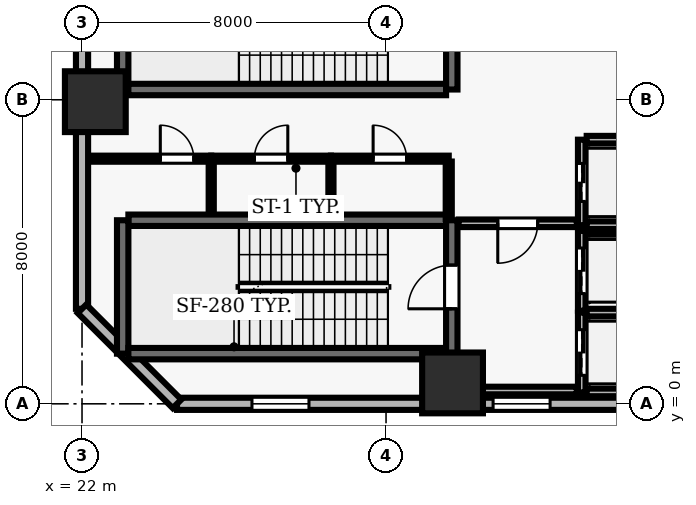
"""IFC4 building model, lengths in metres.
Left out: names, types, materials, properties, quantities, classifications, styles, units other than length and angle.
Written with IfcOpenShell. Run it as: python <this file> out.ifc"""

import sys

from ifc_helpers import new_model, si_unit, direction, frame, frame_2d, origin, origin_2d, place, context, subcontext, project, spatial, rectangle, extrude, element, fill, save


model = new_model("IFC4")
c1 = context("Model", 3, precision=1e-05, world=origin(), true_north=direction((0.0, 1.0)))
c2 = subcontext(c1, "Body", "Model", "MODEL_VIEW")
j1 = project(units=[si_unit("LENGTHUNIT", "METRE"), si_unit("PLANEANGLEUNIT", "RADIAN")], contexts=[c1])
p1 = place(None, origin())
s1 = spatial("IfcSite", under=j1, at=p1, CompositionType="ELEMENT")
p2 = place(p1, origin())
s2 = spatial("IfcBuilding", under=s1, at=p2, CompositionType="ELEMENT")
p3 = place(p2, frame((0.0, 0.0, 5.2)))
s3 = spatial("IfcBuildingStorey", under=s2, at=p3, CompositionType="ELEMENT", Elevation=5.2)
for number, where, z_axis, x_axis in (
    (1, (31.75, 0.55, 0.0), (0.0, 0.0, 1.0), (1.0, 0.0, 0.0)),
    (2, (22.35, 7.95, 0.0), (0.0, 0.0, 1.0), (1.0, 0.0, 0.0)),
):
    element("IfcColumn", number, at=place(p3, frame(where, z_axis=z_axis, x_axis=x_axis)), inside=s3, PredefinedType="COLUMN", context=c2, shape_type="SweptSolid", body=[
        extrude(rectangle(XDim=1.6, YDim=1.6, at=origin_2d()), origin(), (0.0, 0.0, 1.0), 5.2),
    ])
p4 = place(p3, frame((24.5, 0.0, 0.0), z_axis=(0.0, 0.0, 1.0), x_axis=(1.0, 0.0, 0.0)))
e3 = element("IfcWall", 3, at=p4, inside=s3, PredefinedType="SOLIDWALL", context=c2, shape_type="SweptSolid", body=[
    extrude(rectangle(XDim=49.0, YDim=0.32, at=frame_2d((24.5, 0.0))), origin(), (0.0, 0.0, 1.0), 4.92),
])
p5 = place(p4, frame((1.972, 0.0, 0.9)))
e4 = element("IfcOpeningElement", 4, at=p5, cuts=e3, PredefinedType="OPENING", context=c2, shape_type="SweptSolid", body=[
    extrude(rectangle(XDim=1.5, YDim=1.6, at=frame_2d((0.75, 0.8))), frame((0.0, 0.17, 0.0), z_axis=(0.0, -1.0, 0.0), x_axis=(1.0, 0.0, 0.0)), (0.0, 0.0, 1.0), 0.34),
])
p6 = place(p4, frame((8.317, 0.0, 0.9)))
e5 = element("IfcOpeningElement", 5, at=p6, cuts=e3, PredefinedType="OPENING", context=c2, shape_type="SweptSolid", body=[
    extrude(rectangle(XDim=1.5, YDim=1.6, at=frame_2d((0.75, 0.8))), frame((0.0, 0.17, 0.0), z_axis=(0.0, -1.0, 0.0), x_axis=(1.0, 0.0, 0.0)), (0.0, 0.0, 1.0), 0.34),
])
p7 = place(p4, frame((18.306, 0.0, 0.9)))
e6 = element("IfcOpeningElement", 6, at=p7, cuts=e3, PredefinedType="OPENING", context=c2, shape_type="SweptSolid", body=[
    extrude(rectangle(XDim=1.5, YDim=1.6, at=frame_2d((0.75, 0.8))), frame((0.0, 0.17, 0.0), z_axis=(0.0, -1.0, 0.0), x_axis=(1.0, 0.0, 0.0)), (0.0, 0.0, 1.0), 0.34),
])
p8 = place(p4, frame((23.75, 0.0, 0.9)))
e7 = element("IfcOpeningElement", 7, at=p8, cuts=e3, PredefinedType="OPENING", context=c2, shape_type="SweptSolid", body=[
    extrude(rectangle(XDim=1.5, YDim=1.6, at=frame_2d((0.75, 0.8))), frame((0.0, 0.17, 0.0), z_axis=(0.0, -1.0, 0.0), x_axis=(1.0, 0.0, 0.0)), (0.0, 0.0, 1.0), 0.34),
])
p9 = place(p4, frame((29.194, 0.0, 0.9)))
e8 = element("IfcOpeningElement", 8, at=p9, cuts=e3, PredefinedType="OPENING", context=c2, shape_type="SweptSolid", body=[
    extrude(rectangle(XDim=1.5, YDim=1.6, at=frame_2d((0.75, 0.8))), frame((0.0, 0.17, 0.0), z_axis=(0.0, -1.0, 0.0), x_axis=(1.0, 0.0, 0.0)), (0.0, 0.0, 1.0), 0.34),
])
p10 = place(p4, frame((34.639, 0.0, 0.9)))
e9 = element("IfcOpeningElement", 9, at=p10, cuts=e3, PredefinedType="OPENING", context=c2, shape_type="SweptSolid", body=[
    extrude(rectangle(XDim=1.5, YDim=1.6, at=frame_2d((0.75, 0.8))), frame((0.0, 0.17, 0.0), z_axis=(0.0, -1.0, 0.0), x_axis=(1.0, 0.0, 0.0)), (0.0, 0.0, 1.0), 0.34),
])
p11 = place(p4, frame((40.083, 0.0, 0.9)))
e10 = element("IfcOpeningElement", 10, at=p11, cuts=e3, PredefinedType="OPENING", context=c2, shape_type="SweptSolid", body=[
    extrude(rectangle(XDim=1.5, YDim=1.6, at=frame_2d((0.75, 0.8))), frame((0.0, 0.17, 0.0), z_axis=(0.0, -1.0, 0.0), x_axis=(1.0, 0.0, 0.0)), (0.0, 0.0, 1.0), 0.34),
])
p12 = place(p4, frame((45.528, 0.0, 0.9)))
e11 = element("IfcOpeningElement", 11, at=p12, cuts=e3, PredefinedType="OPENING", context=c2, shape_type="SweptSolid", body=[
    extrude(rectangle(XDim=1.5, YDim=1.6, at=frame_2d((0.75, 0.8))), frame((0.0, 0.17, 0.0), z_axis=(0.0, -1.0, 0.0), x_axis=(1.0, 0.0, 0.0)), (0.0, 0.0, 1.0), 0.34),
])
p13 = place(p3, frame((22.0, 51.5, 0.0), z_axis=(0.0, 0.0, 1.0), x_axis=(0.0, -1.0, 0.0)))
e12 = element("IfcWall", 12, at=p13, inside=s3, PredefinedType="SOLIDWALL", context=c2, shape_type="SweptSolid", body=[
    extrude(rectangle(XDim=49.0, YDim=0.32, at=frame_2d((24.5, 0.0))), origin(), (0.0, 0.0, 1.0), 4.92),
])
p14 = place(p13, frame((1.522, 0.0, 0.9)))
e13 = element("IfcOpeningElement", 13, at=p14, cuts=e12, PredefinedType="OPENING", context=c2, shape_type="SweptSolid", body=[
    extrude(rectangle(XDim=2.4, YDim=2.2, at=frame_2d((1.2, 1.1))), frame((0.0, 0.17, 0.0), z_axis=(0.0, -1.0, 0.0), x_axis=(1.0, 0.0, 0.0)), (0.0, 0.0, 1.0), 0.34),
])
p15 = place(p13, frame((6.967, 0.0, 0.9)))
e14 = element("IfcOpeningElement", 14, at=p15, cuts=e12, PredefinedType="OPENING", context=c2, shape_type="SweptSolid", body=[
    extrude(rectangle(XDim=2.4, YDim=2.2, at=frame_2d((1.2, 1.1))), frame((0.0, 0.17, 0.0), z_axis=(0.0, -1.0, 0.0), x_axis=(1.0, 0.0, 0.0)), (0.0, 0.0, 1.0), 0.34),
])
p16 = place(p13, frame((11.961, 0.0, 0.9)))
e15 = element("IfcOpeningElement", 15, at=p16, cuts=e12, PredefinedType="OPENING", context=c2, shape_type="SweptSolid", body=[
    extrude(rectangle(XDim=2.4, YDim=2.2, at=frame_2d((1.2, 1.1))), frame((0.0, 0.17, 0.0), z_axis=(0.0, -1.0, 0.0), x_axis=(1.0, 0.0, 0.0)), (0.0, 0.0, 1.0), 0.34),
])
p17 = place(p13, frame((17.856, 0.0, 0.9)))
e16 = element("IfcOpeningElement", 16, at=p17, cuts=e12, PredefinedType="OPENING", context=c2, shape_type="SweptSolid", body=[
    extrude(rectangle(XDim=2.4, YDim=2.2, at=frame_2d((1.2, 1.1))), frame((0.0, 0.17, 0.0), z_axis=(0.0, -1.0, 0.0), x_axis=(1.0, 0.0, 0.0)), (0.0, 0.0, 1.0), 0.34),
])
p18 = place(p13, frame((22.4, 0.0, 0.9)))
e17 = element("IfcOpeningElement", 17, at=p18, cuts=e12, PredefinedType="OPENING", context=c2, shape_type="SweptSolid", body=[
    extrude(rectangle(XDim=2.4, YDim=2.2, at=frame_2d((1.2, 1.1))), frame((0.0, 0.17, 0.0), z_axis=(0.0, -1.0, 0.0), x_axis=(1.0, 0.0, 0.0)), (0.0, 0.0, 1.0), 0.34),
])
p19 = place(p13, frame((29.194, 0.0, 0.9)))
e18 = element("IfcOpeningElement", 18, at=p19, cuts=e12, PredefinedType="OPENING", context=c2, shape_type="SweptSolid", body=[
    extrude(rectangle(XDim=2.4, YDim=2.2, at=frame_2d((1.2, 1.1))), frame((0.0, 0.17, 0.0), z_axis=(0.0, -1.0, 0.0), x_axis=(1.0, 0.0, 0.0)), (0.0, 0.0, 1.0), 0.34),
])
p20 = place(p13, frame((33.289, 0.0, 0.9)))
e19 = element("IfcOpeningElement", 19, at=p20, cuts=e12, PredefinedType="OPENING", context=c2, shape_type="SweptSolid", body=[
    extrude(rectangle(XDim=2.4, YDim=2.2, at=frame_2d((1.2, 1.1))), frame((0.0, 0.17, 0.0), z_axis=(0.0, -1.0, 0.0), x_axis=(1.0, 0.0, 0.0)), (0.0, 0.0, 1.0), 0.34),
])
p21 = place(p13, frame((39.633, 0.0, 0.9)))
e20 = element("IfcOpeningElement", 20, at=p21, cuts=e12, PredefinedType="OPENING", context=c2, shape_type="SweptSolid", body=[
    extrude(rectangle(XDim=2.4, YDim=2.2, at=frame_2d((1.2, 1.1))), frame((0.0, 0.17, 0.0), z_axis=(0.0, -1.0, 0.0), x_axis=(1.0, 0.0, 0.0)), (0.0, 0.0, 1.0), 0.34),
])
p22 = place(p3, frame((22.0, 2.5, 0.0), z_axis=(0.0, 0.0, 1.0), x_axis=(0.707106781187, -0.707106781187, 0.0)))
e21 = element("IfcWall", 21, at=p22, inside=s3, PredefinedType="SOLIDWALL", context=c2, shape_type="SweptSolid", body=[
    extrude(rectangle(XDim=3.536, YDim=0.32, at=frame_2d((1.768, 0.0))), origin(), (0.0, 0.0, 1.0), 4.92),
])
p23 = place(p3, frame((31.58, 4.83, 0.0), z_axis=(0.0, 0.0, 1.0), x_axis=(-1.0, 0.0, 0.0)))
e22 = element("IfcWall", 22, at=p23, inside=s3, PredefinedType="SHEAR", context=c2, shape_type="SweptSolid", body=[
    extrude(rectangle(XDim=8.36, YDim=0.3, at=frame_2d((4.18, 0.0))), origin(), (0.0, 0.0, 1.0), 4.92),
])
p24 = place(p3, frame((23.07, 4.83, 0.0), z_axis=(0.0, 0.0, 1.0), x_axis=(0.0, -1.0, 0.0)))
e23 = element("IfcWall", 23, at=p24, inside=s3, PredefinedType="SHEAR", context=c2, shape_type="SweptSolid", body=[
    extrude(rectangle(XDim=3.51, YDim=0.3, at=frame_2d((1.755, 0.0))), origin(), (0.0, 0.0, 1.0), 4.92),
])
p25 = place(p3, frame((23.22, 1.32, 0.0), z_axis=(0.0, 0.0, 1.0), x_axis=(1.0, 0.0, 0.0)))
e24 = element("IfcWall", 24, at=p25, inside=s3, PredefinedType="SHEAR", context=c2, shape_type="SweptSolid", body=[
    extrude(rectangle(XDim=8.36, YDim=0.3, at=frame_2d((4.18, 0.0))), origin(), (0.0, 0.0, 1.0), 4.92),
])
p26 = place(p3, frame((31.73, 0.96, 0.0), z_axis=(0.0, 0.0, 1.0), x_axis=(0.0, 1.0, 0.0)))
e25 = element("IfcWall", 25, at=p26, inside=s3, PredefinedType="SHEAR", context=c2, shape_type="SweptSolid", body=[
    extrude(rectangle(XDim=3.87, YDim=0.3, at=frame_2d((1.935, 0.0))), origin(), (0.0, 0.0, 1.0), 4.92),
])
p27 = place(p26, frame((1.54, 0.0, 0.0)))
e26 = element("IfcOpeningElement", 26, at=p27, cuts=e25, PredefinedType="OPENING", context=c2, shape_type="SweptSolid", body=[
    extrude(rectangle(XDim=1.15, YDim=2.15, at=frame_2d((0.575, 1.075))), frame((0.0, 0.16, 0.0), z_axis=(0.0, -1.0, 0.0), x_axis=(1.0, 0.0, 0.0)), (0.0, 0.0, 1.0), 0.32),
])
p28 = place(p3, frame((23.07, 11.78, 0.0), z_axis=(0.0, 0.0, 1.0), x_axis=(0.0, -1.0, 0.0)))
e27 = element("IfcWall", 27, at=p28, inside=s3, PredefinedType="SHEAR", context=c2, shape_type="SweptSolid", body=[
    extrude(rectangle(XDim=3.51, YDim=0.3, at=frame_2d((1.755, 0.0))), origin(), (0.0, 0.0, 1.0), 4.92),
])
p29 = place(p3, frame((23.22, 8.27, 0.0), z_axis=(0.0, 0.0, 1.0), x_axis=(1.0, 0.0, 0.0)))
e28 = element("IfcWall", 28, at=p29, inside=s3, PredefinedType="SHEAR", context=c2, shape_type="SweptSolid", body=[
    extrude(rectangle(XDim=8.36, YDim=0.3, at=frame_2d((4.18, 0.0))), origin(), (0.0, 0.0, 1.0), 4.92),
])
p30 = place(p3, frame((31.73, 8.27, 0.0), z_axis=(0.0, 0.0, 1.0), x_axis=(0.0, 1.0, 0.0)))
e29 = element("IfcWall", 29, at=p30, inside=s3, PredefinedType="SHEAR", context=c2, shape_type="SweptSolid", body=[
    extrude(rectangle(XDim=3.51, YDim=0.3, at=frame_2d((1.755, 0.0))), origin(), (0.0, 0.0, 1.0), 4.92),
])
p31 = place(p30, frame((1.18, 0.0, 0.0)))
e30 = element("IfcOpeningElement", 30, at=p31, cuts=e29, PredefinedType="OPENING", context=c2, shape_type="SweptSolid", body=[
    extrude(rectangle(XDim=1.15, YDim=2.15, at=frame_2d((0.575, 1.075))), frame((0.0, 0.16, 0.0), z_axis=(0.0, -1.0, 0.0), x_axis=(1.0, 0.0, 0.0)), (0.0, 0.0, 1.0), 0.32),
])
p32 = place(p3, frame((35.15, 2.4, 0.0), z_axis=(0.0, 0.0, 1.0), x_axis=(0.0, -1.0, 0.0)))
e31 = element("IfcWall", 31, at=p32, inside=s3, PredefinedType="SOLIDWALL", context=c2, shape_type="SweptSolid", body=[
    extrude(rectangle(XDim=2.1, YDim=0.2, at=frame_2d((1.05, 0.0))), origin(), (0.0, 0.0, 1.0), 4.92),
])
p33 = place(p32, frame((0.45, 0.0, 0.0)))
e32 = element("IfcOpeningElement", 32, at=p33, cuts=e31, PredefinedType="OPENING", context=c2, shape_type="SweptSolid", body=[
    extrude(rectangle(XDim=1.2, YDim=2.15, at=frame_2d((0.6, 1.075))), frame((0.0, 0.11, 0.0), z_axis=(0.0, -1.0, 0.0), x_axis=(1.0, 0.0, 0.0)), (0.0, 0.0, 1.0), 0.22),
])
for number, where, z_axis, x_axis in (
    (33, (35.28, 0.3, 0.0), (0.0, 0.0, 1.0), (1.0, 0.0, 0.0)),
    (34, (37.42, 2.4, 0.0), (0.0, 0.0, 1.0), (-1.0, 0.0, 0.0)),
):
    element("IfcWall", number, at=place(p3, frame(where, z_axis=z_axis, x_axis=x_axis)), inside=s3, PredefinedType="SOLIDWALL", context=c2, shape_type="SweptSolid", body=[
        extrude(rectangle(XDim=2.14, YDim=0.2, at=frame_2d((1.07, 0.0))), origin(), (0.0, 0.0, 1.0), 4.92),
    ])
p34 = place(p3, frame((35.15, 4.55, 0.0), z_axis=(0.0, 0.0, 1.0), x_axis=(0.0, -1.0, 0.0)))
e35 = element("IfcWall", 35, at=p34, inside=s3, PredefinedType="SOLIDWALL", context=c2, shape_type="SweptSolid", body=[
    extrude(rectangle(XDim=2.1, YDim=0.2, at=frame_2d((1.05, 0.0))), origin(), (0.0, 0.0, 1.0), 4.92),
])
p35 = place(p34, frame((0.45, 0.0, 0.0)))
e36 = element("IfcOpeningElement", 36, at=p35, cuts=e35, PredefinedType="OPENING", context=c2, shape_type="SweptSolid", body=[
    extrude(rectangle(XDim=1.2, YDim=2.15, at=frame_2d((0.6, 1.075))), frame((0.0, 0.11, 0.0), z_axis=(0.0, -1.0, 0.0), x_axis=(1.0, 0.0, 0.0)), (0.0, 0.0, 1.0), 0.22),
])
p36 = place(p3, frame((37.42, 4.55, 0.0), z_axis=(0.0, 0.0, 1.0), x_axis=(-1.0, 0.0, 0.0)))
e37 = element("IfcWall", 37, at=p36, inside=s3, PredefinedType="SOLIDWALL", context=c2, shape_type="SweptSolid", body=[
    extrude(rectangle(XDim=2.14, YDim=0.2, at=frame_2d((1.07, 0.0))), origin(), (0.0, 0.0, 1.0), 4.92),
])
p37 = place(p3, frame((35.15, 6.95, 0.0), z_axis=(0.0, 0.0, 1.0), x_axis=(0.0, -1.0, 0.0)))
e38 = element("IfcWall", 38, at=p37, inside=s3, PredefinedType="SOLIDWALL", context=c2, shape_type="SweptSolid", body=[
    extrude(rectangle(XDim=2.25, YDim=0.2, at=frame_2d((1.125, 0.0))), origin(), (0.0, 0.0, 1.0), 4.92),
])
p38 = place(p37, frame((0.625, 0.0, 0.0)))
e39 = element("IfcOpeningElement", 39, at=p38, cuts=e38, PredefinedType="OPENING", context=c2, shape_type="SweptSolid", body=[
    extrude(rectangle(XDim=1.0, YDim=2.1, at=frame_2d((0.5, 1.05))), frame((0.0, 0.11, 0.0), z_axis=(0.0, -1.0, 0.0), x_axis=(1.0, 0.0, 0.0)), (0.0, 0.0, 1.0), 0.22),
])
for number, where, z_axis, x_axis in (
    (40, (35.28, 4.7, 0.0), (0.0, 0.0, 1.0), (1.0, 0.0, 0.0)),
    (41, (37.42, 6.95, 0.0), (0.0, 0.0, 1.0), (-1.0, 0.0, 0.0)),
):
    element("IfcWall", number, at=place(p3, frame(where, z_axis=z_axis, x_axis=x_axis)), inside=s3, PredefinedType="SOLIDWALL", context=c2, shape_type="SweptSolid", body=[
        extrude(rectangle(XDim=2.14, YDim=0.2, at=frame_2d((1.07, 0.0))), origin(), (0.0, 0.0, 1.0), 4.92),
    ])
p39 = place(p3, frame((22.2, 6.45, 0.0), z_axis=(0.0, 0.0, 1.0), x_axis=(1.0, 0.0, 0.0)))
e42 = element("IfcWall", 42, at=p39, inside=s3, PredefinedType="PARTITIONING", context=c2, shape_type="SweptSolid", body=[
    extrude(rectangle(XDim=3.2, YDim=0.16, at=frame_2d((1.6, 0.0))), origin(), (0.0, 0.0, 1.0), 4.92),
])
p40 = place(p39, frame((1.86, 0.0, 0.0)))
e43 = element("IfcOpeningElement", 43, at=p40, cuts=e42, PredefinedType="OPENING", context=c2, shape_type="SweptSolid", body=[
    extrude(rectangle(XDim=0.88, YDim=2.1, at=frame_2d((0.44, 1.05))), frame((0.0, 0.09, 0.0), z_axis=(0.0, -1.0, 0.0), x_axis=(1.0, 0.0, 0.0)), (0.0, 0.0, 1.0), 0.18),
])
p41 = place(p3, frame((25.4, 6.45, 0.0), z_axis=(0.0, 0.0, 1.0), x_axis=(1.0, 0.0, 0.0)))
e44 = element("IfcWall", 44, at=p41, inside=s3, PredefinedType="PARTITIONING", context=c2, shape_type="SweptSolid", body=[
    extrude(rectangle(XDim=3.15, YDim=0.16, at=frame_2d((1.575, 0.0))), origin(), (0.0, 0.0, 1.0), 4.92),
])
p42 = place(p41, frame((1.135, 0.0, 0.0)))
e45 = element("IfcOpeningElement", 45, at=p42, cuts=e44, PredefinedType="OPENING", context=c2, shape_type="SweptSolid", body=[
    extrude(rectangle(XDim=0.88, YDim=2.1, at=frame_2d((0.44, 1.05))), frame((0.0, 0.09, 0.0), z_axis=(0.0, -1.0, 0.0), x_axis=(1.0, 0.0, 0.0)), (0.0, 0.0, 1.0), 0.18),
])
p43 = place(p3, frame((28.55, 6.45, 0.0), z_axis=(0.0, 0.0, 1.0), x_axis=(1.0, 0.0, 0.0)))
e46 = element("IfcWall", 46, at=p43, inside=s3, PredefinedType="PARTITIONING", context=c2, shape_type="SweptSolid", body=[
    extrude(rectangle(XDim=3.1, YDim=0.16, at=frame_2d((1.55, 0.0))), origin(), (0.0, 0.0, 1.0), 4.92),
])
p44 = place(p43, frame((1.11, 0.0, 0.0)))
e47 = element("IfcOpeningElement", 47, at=p44, cuts=e46, PredefinedType="OPENING", context=c2, shape_type="SweptSolid", body=[
    extrude(rectangle(XDim=0.88, YDim=2.1, at=frame_2d((0.44, 1.05))), frame((0.0, 0.09, 0.0), z_axis=(0.0, -1.0, 0.0), x_axis=(1.0, 0.0, 0.0)), (0.0, 0.0, 1.0), 0.18),
])
p45 = place(p3, frame((31.65, 0.35, 0.0), z_axis=(0.0, 0.0, 1.0), x_axis=(1.0, 0.0, 0.0)))
e48 = element("IfcWall", 48, at=p45, inside=s3, PredefinedType="SOLIDWALL", context=c2, shape_type="SweptSolid", body=[
    extrude(rectangle(XDim=3.37, YDim=0.2, at=frame_2d((1.685, 0.0))), origin(), (0.0, 0.0, 1.0), 4.92),
])
p46 = place(p3, frame((35.02, 4.75, 0.0), z_axis=(0.0, 0.0, 1.0), x_axis=(-1.0, 0.0, 0.0)))
e49 = element("IfcWall", 49, at=p46, inside=s3, PredefinedType="SOLIDWALL", context=c2, shape_type="SweptSolid", body=[
    extrude(rectangle(XDim=3.11, YDim=0.2, at=frame_2d((1.555, 0.0))), origin(), (0.0, 0.0, 1.0), 4.92),
])
p47 = place(p46, frame((1.03, 0.0, 0.0)))
e50 = element("IfcOpeningElement", 50, at=p47, cuts=e49, PredefinedType="OPENING", context=c2, shape_type="SweptSolid", body=[
    extrude(rectangle(XDim=1.05, YDim=2.15, at=frame_2d((0.525, 1.075))), frame((0.0, 0.11, 0.0), z_axis=(0.0, -1.0, 0.0), x_axis=(1.0, 0.0, 0.0)), (0.0, 0.0, 1.0), 0.22),
])
for number, where, z_axis, x_axis in (
    (51, (25.4, 5.01, 0.0), (0.0, 0.0, 1.0), (0.0, 1.0, 0.0)),
    (52, (28.55, 5.01, 0.0), (0.0, 0.0, 1.0), (0.0, 1.0, 0.0)),
):
    element("IfcWall", number, at=place(p3, frame(where, z_axis=z_axis, x_axis=x_axis)), inside=s3, PredefinedType="PARTITIONING", context=c2, shape_type="SweptSolid", body=[
        extrude(rectangle(XDim=1.365, YDim=0.135, at=frame_2d((0.683, 0.0))), origin(), (0.0, 0.0, 1.0), 4.92),
    ])
p48 = place(p3, frame((31.65, 4.86, 0.0), z_axis=(0.0, 0.0, 1.0), x_axis=(0.0, 1.0, 0.0)))
e53 = element("IfcWall", 53, at=p48, inside=s3, PredefinedType="PARTITIONING", context=c2, shape_type="SweptSolid", body=[
    extrude(rectangle(XDim=1.515, YDim=0.16, at=frame_2d((0.757, 0.0))), origin(), (0.0, 0.0, 1.0), 4.92),
])
p49 = place(p5, origin())
e54 = element("IfcWindow", 54, at=p49, inside=s3, PartitioningType="SINGLE_PANEL", PredefinedType="WINDOW", context=c2, shape_type="SweptSolid", body=[
    extrude(rectangle(XDim=1.5, YDim=1.6, at=frame_2d((0.75, 0.8))), frame((0.0, 0.03, 0.0), z_axis=(0.0, -1.0, 0.0), x_axis=(1.0, 0.0, 0.0)), (0.0, 0.0, 1.0), 0.06),
])
fill(e4, e54)
p50 = place(p6, origin())
e55 = element("IfcWindow", 55, at=p50, inside=s3, PartitioningType="SINGLE_PANEL", PredefinedType="WINDOW", context=c2, shape_type="SweptSolid", body=[
    extrude(rectangle(XDim=1.5, YDim=1.6, at=frame_2d((0.75, 0.8))), frame((0.0, 0.03, 0.0), z_axis=(0.0, -1.0, 0.0), x_axis=(1.0, 0.0, 0.0)), (0.0, 0.0, 1.0), 0.06),
])
fill(e5, e55)
p51 = place(p27, origin())
e56 = element("IfcDoor", 56, at=p51, inside=s3, OperationType="SINGLE_SWING_LEFT", PredefinedType="DOOR", context=c2, shape_type="SweptSolid", body=[
    extrude(rectangle(XDim=1.15, YDim=2.15, at=frame_2d((0.575, 1.075))), frame((0.0, 0.025, 0.0), z_axis=(0.0, -1.0, 0.0), x_axis=(1.0, 0.0, 0.0)), (0.0, 0.0, 1.0), 0.05),
])
fill(e26, e56)
p52 = place(p33, origin())
e57 = element("IfcDoor", 57, at=p52, inside=s3, OperationType="DOUBLE_DOOR_SLIDING", PredefinedType="DOOR", context=c2, shape_type="SweptSolid", body=[
    extrude(rectangle(XDim=1.2, YDim=2.15, at=frame_2d((0.6, 1.075))), frame((0.0, 0.025, 0.0), z_axis=(0.0, -1.0, 0.0), x_axis=(1.0, 0.0, 0.0)), (0.0, 0.0, 1.0), 0.05),
])
fill(e32, e57)
p53 = place(p35, origin())
e58 = element("IfcDoor", 58, at=p53, inside=s3, OperationType="DOUBLE_DOOR_SLIDING", PredefinedType="DOOR", context=c2, shape_type="SweptSolid", body=[
    extrude(rectangle(XDim=1.2, YDim=2.15, at=frame_2d((0.6, 1.075))), frame((0.0, 0.025, 0.0), z_axis=(0.0, -1.0, 0.0), x_axis=(1.0, 0.0, 0.0)), (0.0, 0.0, 1.0), 0.05),
])
fill(e36, e58)
p54 = place(p38, origin())
e59 = element("IfcDoor", 59, at=p54, inside=s3, OperationType="DOUBLE_DOOR_SLIDING", PredefinedType="DOOR", context=c2, shape_type="SweptSolid", body=[
    extrude(rectangle(XDim=1.0, YDim=2.1, at=frame_2d((0.5, 1.05))), frame((0.0, 0.025, 0.0), z_axis=(0.0, -1.0, 0.0), x_axis=(1.0, 0.0, 0.0)), (0.0, 0.0, 1.0), 0.05),
])
fill(e39, e59)
p55 = place(p47, origin())
e60 = element("IfcDoor", 60, at=p55, inside=s3, OperationType="SINGLE_SWING_RIGHT", PredefinedType="DOOR", context=c2, shape_type="SweptSolid", body=[
    extrude(rectangle(XDim=1.05, YDim=2.15, at=frame_2d((0.525, 1.075))), frame((0.0, 0.025, 0.0), z_axis=(0.0, -1.0, 0.0), x_axis=(1.0, 0.0, 0.0)), (0.0, 0.0, 1.0), 0.05),
])
fill(e50, e60)
p56 = place(p40, origin())
e61 = element("IfcDoor", 61, at=p56, inside=s3, OperationType="SINGLE_SWING_LEFT", PredefinedType="DOOR", context=c2, shape_type="SweptSolid", body=[
    extrude(rectangle(XDim=0.88, YDim=2.1, at=frame_2d((0.44, 1.05))), frame((0.0, 0.025, 0.0), z_axis=(0.0, -1.0, 0.0), x_axis=(1.0, 0.0, 0.0)), (0.0, 0.0, 1.0), 0.05),
])
fill(e43, e61)
p57 = place(p42, origin())
e62 = element("IfcDoor", 62, at=p57, inside=s3, OperationType="SINGLE_SWING_RIGHT", PredefinedType="DOOR", context=c2, shape_type="SweptSolid", body=[
    extrude(rectangle(XDim=0.88, YDim=2.1, at=frame_2d((0.44, 1.05))), frame((0.0, 0.025, 0.0), z_axis=(0.0, -1.0, 0.0), x_axis=(1.0, 0.0, 0.0)), (0.0, 0.0, 1.0), 0.05),
])
fill(e45, e62)
p58 = place(p44, origin())
e63 = element("IfcDoor", 63, at=p58, inside=s3, OperationType="SINGLE_SWING_LEFT", PredefinedType="DOOR", context=c2, shape_type="SweptSolid", body=[
    extrude(rectangle(XDim=0.88, YDim=2.1, at=frame_2d((0.44, 1.05))), frame((0.0, 0.025, 0.0), z_axis=(0.0, -1.0, 0.0), x_axis=(1.0, 0.0, 0.0)), (0.0, 0.0, 1.0), 0.05),
])
fill(e47, e63)
save(model, sys.argv[1])
